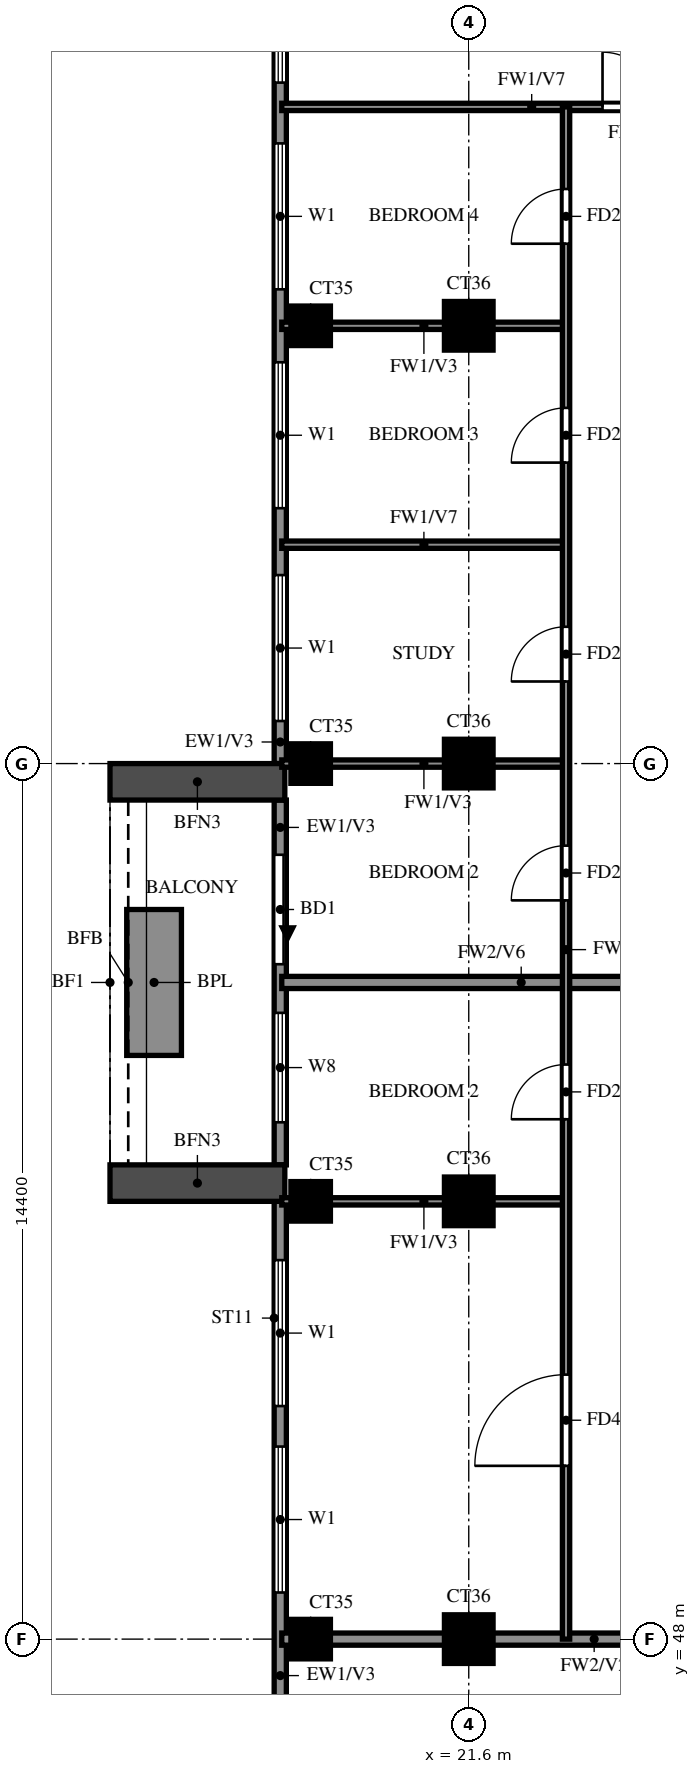
"""IFC4 building model, lengths in metres.
Left out: names, types, materials, properties, quantities, classifications, styles, units other than length and angle.
Written with IfcOpenShell. Run it as: python <this file> out.ifc"""

import sys

from ifc_helpers import new_model, si_unit, direction, frame, frame_2d, origin, origin_2d, place, context, subcontext, project, spatial, rectangle, extrude, source, transform, mapped, element, fill, save


model = new_model("IFC4")
c1 = context("Model", 3, precision=1e-05, world=origin(), true_north=direction((0.0, 1.0)))
c2 = subcontext(c1, "Body", "Model", "MODEL_VIEW")
j1 = project(units=[si_unit("LENGTHUNIT", "METRE"), si_unit("PLANEANGLEUNIT", "RADIAN")], contexts=[c1])
p1 = place(None, origin())
s1 = spatial("IfcSite", under=j1, at=p1, CompositionType="ELEMENT")
p2 = place(p1, origin())
s2 = spatial("IfcBuilding", under=s1, at=p2, CompositionType="ELEMENT")
p3 = place(p2, frame((0.0, 0.0, 236.0)))
s3 = spatial("IfcBuildingStorey", under=s2, at=p3, CompositionType="ELEMENT", Elevation=236.0)
m1 = source(origin(), c2, "Body", "SweptSolid", [
    extrude(rectangle(XDim=0.65, YDim=0.65, at=origin_2d()), origin(), (0.0, 0.0, 1.0), 3.22),
])
p4 = place(p3, frame((19.0, 48.0, 0.0), z_axis=(0.0, 0.0, 1.0), x_axis=(1.0, 0.0, 0.0)))
e1 = element("IfcColumn", 1, at=p4, inside=s3, PredefinedType="COLUMN", context=c2, shape_type="MappedRepresentation", body=[
    mapped(m1, transform((0.0, 0.0, 0.0))),
])
m2 = source(origin(), c2, "Body", "SweptSolid", [
    extrude(rectangle(XDim=0.8, YDim=0.8, at=origin_2d()), origin(), (0.0, 0.0, 1.0), 3.22),
])
p5 = place(p3, frame((21.6, 48.0, 0.0), z_axis=(0.0, 0.0, 1.0), x_axis=(1.0, 0.0, 0.0)))
e2 = element("IfcColumn", 2, at=p5, inside=s3, PredefinedType="COLUMN", context=c2, shape_type="MappedRepresentation", body=[
    mapped(m2, transform((0.0, 0.0, 0.0))),
])
p6 = place(p3, frame((19.0, 55.2, 0.0), z_axis=(0.0, 0.0, 1.0), x_axis=(1.0, 0.0, 0.0)))
e3 = element("IfcColumn", 3, at=p6, inside=s3, PredefinedType="COLUMN", context=c2, shape_type="MappedRepresentation", body=[
    mapped(m1, transform((0.0, 0.0, 0.0))),
])
p7 = place(p3, frame((21.6, 55.2, 0.0), z_axis=(0.0, 0.0, 1.0), x_axis=(1.0, 0.0, 0.0)))
e4 = element("IfcColumn", 4, at=p7, inside=s3, PredefinedType="COLUMN", context=c2, shape_type="MappedRepresentation", body=[
    mapped(m2, transform((0.0, 0.0, 0.0))),
])
p8 = place(p3, frame((19.0, 62.4, 0.0), z_axis=(0.0, 0.0, 1.0), x_axis=(1.0, 0.0, 0.0)))
e5 = element("IfcColumn", 5, at=p8, inside=s3, PredefinedType="COLUMN", context=c2, shape_type="MappedRepresentation", body=[
    mapped(m1, transform((0.0, 0.0, 0.0))),
])
p9 = place(p3, frame((21.6, 62.4, 0.0), z_axis=(0.0, 0.0, 1.0), x_axis=(1.0, 0.0, 0.0)))
e6 = element("IfcColumn", 6, at=p9, inside=s3, PredefinedType="COLUMN", context=c2, shape_type="MappedRepresentation", body=[
    mapped(m2, transform((0.0, 0.0, 0.0))),
])
p10 = place(p3, frame((19.0, 69.6, 0.0), z_axis=(0.0, 0.0, 1.0), x_axis=(1.0, 0.0, 0.0)))
e7 = element("IfcColumn", 7, at=p10, inside=s3, PredefinedType="COLUMN", context=c2, shape_type="MappedRepresentation", body=[
    mapped(m1, transform((0.0, 0.0, 0.0))),
])
p11 = place(p3, frame((21.6, 69.6, 0.0), z_axis=(0.0, 0.0, 1.0), x_axis=(1.0, 0.0, 0.0)))
e8 = element("IfcColumn", 8, at=p11, inside=s3, PredefinedType="COLUMN", context=c2, shape_type="MappedRepresentation", body=[
    mapped(m2, transform((0.0, 0.0, 0.0))),
])
p12 = place(p3, frame((18.5, 76.6, 0.0), z_axis=(0.0, 0.0, 1.0), x_axis=(0.0, -1.0, 0.0)))
e9 = element("IfcWall", 9, at=p12, inside=s3, PredefinedType="SOLIDWALL", context=c2, shape_type="SweptSolid", body=[
    extrude(rectangle(XDim=14.2, YDim=0.2, at=frame_2d((7.1, 0.0))), origin(), (0.0, 0.0, 1.0), 3.22),
])
p13 = place(p12, frame((11.1, 0.0, 0.6)))
e10 = element("IfcOpeningElement", 10, at=p13, cuts=e9, PredefinedType="OPENING", context=c2, shape_type="SweptSolid", body=[
    extrude(rectangle(XDim=2.4, YDim=2.4, at=frame_2d((1.2, 1.2))), frame((0.0, 0.11, 0.0), z_axis=(0.0, -1.0, 0.0), x_axis=(1.0, 0.0, 0.0)), (0.0, 0.0, 1.0), 0.22),
])
p14 = place(p12, frame((7.6, 0.0, 0.6)))
e11 = element("IfcOpeningElement", 11, at=p14, cuts=e9, PredefinedType="OPENING", context=c2, shape_type="SweptSolid", body=[
    extrude(rectangle(XDim=2.4, YDim=2.4, at=frame_2d((1.2, 1.2))), frame((0.0, 0.11, 0.0), z_axis=(0.0, -1.0, 0.0), x_axis=(1.0, 0.0, 0.0)), (0.0, 0.0, 1.0), 0.22),
])
p15 = place(p12, frame((4.0, 0.0, 0.6)))
e12 = element("IfcOpeningElement", 12, at=p15, cuts=e9, PredefinedType="OPENING", context=c2, shape_type="SweptSolid", body=[
    extrude(rectangle(XDim=2.4, YDim=2.4, at=frame_2d((1.2, 1.2))), frame((0.0, 0.11, 0.0), z_axis=(0.0, -1.0, 0.0), x_axis=(1.0, 0.0, 0.0)), (0.0, 0.0, 1.0), 0.22),
])
p16 = place(p12, frame((0.6, 0.0, 0.6)))
e13 = element("IfcOpeningElement", 13, at=p16, cuts=e9, PredefinedType="OPENING", context=c2, shape_type="SweptSolid", body=[
    extrude(rectangle(XDim=2.4, YDim=2.4, at=frame_2d((1.2, 1.2))), frame((0.0, 0.11, 0.0), z_axis=(0.0, -1.0, 0.0), x_axis=(1.0, 0.0, 0.0)), (0.0, 0.0, 1.0), 0.22),
])
p17 = place(p3, frame((18.5, 61.8, 0.0), z_axis=(0.0, 0.0, 1.0), x_axis=(0.0, -1.0, 0.0)))
e14 = element("IfcWall", 14, at=p17, inside=s3, PredefinedType="SOLIDWALL", context=c2, shape_type="SweptSolid", body=[
    extrude(rectangle(XDim=6.0, YDim=0.2, at=frame_2d((3.0, 0.0))), origin(), (0.0, 0.0, 1.0), 3.22),
])
p18 = place(p17, frame((0.9, 0.0, 0.0)))
e15 = element("IfcOpeningElement", 15, at=p18, cuts=e14, PredefinedType="OPENING", context=c2, shape_type="SweptSolid", body=[
    extrude(rectangle(XDim=1.8, YDim=2.4, at=frame_2d((0.9, 1.2))), frame((0.0, 0.11, 0.0), z_axis=(0.0, -1.0, 0.0), x_axis=(1.0, 0.0, 0.0)), (0.0, 0.0, 1.0), 0.22),
])
p19 = place(p17, frame((3.5, 0.0, 0.6)))
e16 = element("IfcOpeningElement", 16, at=p19, cuts=e14, PredefinedType="OPENING", context=c2, shape_type="SweptSolid", body=[
    extrude(rectangle(XDim=1.8, YDim=2.4, at=frame_2d((0.9, 1.2))), frame((0.0, 0.11, 0.0), z_axis=(0.0, -1.0, 0.0), x_axis=(1.0, 0.0, 0.0)), (0.0, 0.0, 1.0), 0.22),
])
p20 = place(p3, frame((18.5, 55.2, 0.0), z_axis=(0.0, 0.0, 1.0), x_axis=(0.0, -1.0, 0.0)))
e17 = element("IfcWall", 17, at=p20, inside=s3, PredefinedType="SOLIDWALL", context=c2, shape_type="SweptSolid", body=[
    extrude(rectangle(XDim=12.0, YDim=0.2, at=frame_2d((6.0, 0.0))), origin(), (0.0, 0.0, 1.0), 3.22),
])
p21 = place(p20, frame((8.3, 0.0, 0.6)))
e18 = element("IfcOpeningElement", 18, at=p21, cuts=e17, PredefinedType="OPENING", context=c2, shape_type="SweptSolid", body=[
    extrude(rectangle(XDim=2.4, YDim=2.4, at=frame_2d((1.2, 1.2))), frame((0.0, 0.11, 0.0), z_axis=(0.0, -1.0, 0.0), x_axis=(1.0, 0.0, 0.0)), (0.0, 0.0, 1.0), 0.22),
])
p22 = place(p20, frame((0.967, 0.0, 0.6)))
e19 = element("IfcOpeningElement", 19, at=p22, cuts=e17, PredefinedType="OPENING", context=c2, shape_type="SweptSolid", body=[
    extrude(rectangle(XDim=2.4, YDim=2.4, at=frame_2d((1.2, 1.2))), frame((0.0, 0.11, 0.0), z_axis=(0.0, -1.0, 0.0), x_axis=(1.0, 0.0, 0.0)), (0.0, 0.0, 1.0), 0.22),
])
p23 = place(p20, frame((4.033, 0.0, 0.6)))
e20 = element("IfcOpeningElement", 20, at=p23, cuts=e17, PredefinedType="OPENING", context=c2, shape_type="SweptSolid", body=[
    extrude(rectangle(XDim=2.4, YDim=2.4, at=frame_2d((1.2, 1.2))), frame((0.0, 0.11, 0.0), z_axis=(0.0, -1.0, 0.0), x_axis=(1.0, 0.0, 0.0)), (0.0, 0.0, 1.0), 0.22),
])
for number, where, z_axis, x_axis in (
    (21, (18.575, 62.1, 0.0), (0.0, 0.0, 1.0), (-1.0, 0.0, 0.0)),
    (22, (18.575, 55.5, 0.0), (0.0, 0.0, 1.0), (-1.0, 0.0, 0.0)),
):
    element("IfcWall", number, at=place(p3, frame(where, z_axis=z_axis, x_axis=x_axis)), inside=s3, PredefinedType="SOLIDWALL", context=c2, shape_type="SweptSolid", body=[
        extrude(rectangle(XDim=2.875, YDim=0.6, at=frame_2d((1.438, 0.0))), origin(), (0.0, 0.0, 1.0), 2.85),
    ])
p24 = place(p3, frame((16.425, 60.0, 0.0), z_axis=(0.0, 0.0, 1.0), x_axis=(0.0, -1.0, 0.0)))
e23 = element("IfcWall", 23, at=p24, inside=s3, PredefinedType="SOLIDWALL", context=c2, shape_type="SweptSolid", body=[
    extrude(rectangle(XDim=2.4, YDim=0.9, at=frame_2d((1.2, 0.0))), origin(), (0.0, 0.0, 1.0), 0.9),
])
p25 = place(p3, frame((18.525, 48.0, 0.0), z_axis=(0.0, 0.0, 1.0), x_axis=(1.0, 0.0, 0.0)))
e24 = element("IfcWall", 24, at=p25, inside=s3, PredefinedType="SOLIDWALL", context=c2, shape_type="SweptSolid", body=[
    extrude(rectangle(XDim=10.275, YDim=0.2, at=frame_2d((5.138, 0.0))), origin(), (0.0, 0.0, 1.0), 3.22),
])
p26 = place(p3, frame((18.525, 58.8, 0.0), z_axis=(0.0, 0.0, 1.0), x_axis=(1.0, 0.0, 0.0)))
e25 = element("IfcWall", 25, at=p26, inside=s3, PredefinedType="SOLIDWALL", context=c2, shape_type="SweptSolid", body=[
    extrude(rectangle(XDim=7.875, YDim=0.2, at=frame_2d((3.938, 0.0))), origin(), (0.0, 0.0, 1.0), 2.32),
])
for number, where, z_axis, x_axis in (
    (26, (18.525, 55.2, 0.0), (0.0, 0.0, 1.0), (1.0, 0.0, 0.0)),
    (27, (18.525, 62.4, 0.0), (0.0, 0.0, 1.0), (1.0, 0.0, 0.0)),
):
    element("IfcWall", number, at=place(p3, frame(where, z_axis=z_axis, x_axis=x_axis)), inside=s3, PredefinedType="PARTITIONING", context=c2, shape_type="SweptSolid", body=[
        extrude(rectangle(XDim=4.675, YDim=0.12, at=frame_2d((2.337, 0.0))), origin(), (0.0, 0.0, 1.0), 3.22),
    ])
p27 = place(p3, frame((18.525, 66.0, 0.0), z_axis=(0.0, 0.0, 1.0), x_axis=(1.0, 0.0, 0.0)))
e28 = element("IfcWall", 28, at=p27, inside=s3, PredefinedType="PARTITIONING", context=c2, shape_type="SweptSolid", body=[
    extrude(rectangle(XDim=4.675, YDim=0.12, at=frame_2d((2.337, 0.0))), origin(), (0.0, 0.0, 1.0), 2.32),
])
p28 = place(p3, frame((18.525, 69.6, 0.0), z_axis=(0.0, 0.0, 1.0), x_axis=(1.0, 0.0, 0.0)))
e29 = element("IfcWall", 29, at=p28, inside=s3, PredefinedType="PARTITIONING", context=c2, shape_type="SweptSolid", body=[
    extrude(rectangle(XDim=4.675, YDim=0.12, at=frame_2d((2.337, 0.0))), origin(), (0.0, 0.0, 1.0), 3.22),
])
p29 = place(p3, frame((18.525, 73.2, 0.0), z_axis=(0.0, 0.0, 1.0), x_axis=(1.0, 0.0, 0.0)))
e30 = element("IfcWall", 30, at=p29, inside=s3, PredefinedType="PARTITIONING", context=c2, shape_type="SweptSolid", body=[
    extrude(rectangle(XDim=10.275, YDim=0.12, at=frame_2d((5.138, 0.0))), origin(), (0.0, 0.0, 1.0), 2.32),
])
p30 = place(p29, frame((5.275, 0.0, 0.0)))
e31 = element("IfcOpeningElement", 31, at=p30, cuts=e30, PredefinedType="OPENING", context=c2, shape_type="SweptSolid", body=[
    extrude(rectangle(XDim=0.9, YDim=2.1, at=frame_2d((0.45, 1.05))), frame((0.0, 0.07, 0.0), z_axis=(0.0, -1.0, 0.0), x_axis=(1.0, 0.0, 0.0)), (0.0, 0.0, 1.0), 0.14),
])
p31 = place(p3, frame((23.2, 48.0, 0.0), z_axis=(0.0, 0.0, 1.0), x_axis=(0.0, 1.0, 0.0)))
e32 = element("IfcWall", 32, at=p31, inside=s3, PredefinedType="PARTITIONING", context=c2, shape_type="SweptSolid", body=[
    extrude(rectangle(XDim=25.2, YDim=0.12, at=frame_2d((12.6, 0.0))), origin(), (0.0, 0.0, 1.0), 3.22),
])
p32 = place(p31, frame((2.85, 0.0, 0.0)))
e33 = element("IfcOpeningElement", 33, at=p32, cuts=e32, PredefinedType="OPENING", context=c2, shape_type="SweptSolid", body=[
    extrude(rectangle(XDim=1.5, YDim=2.1, at=frame_2d((0.75, 1.05))), frame((0.0, 0.07, 0.0), z_axis=(0.0, -1.0, 0.0), x_axis=(1.0, 0.0, 0.0)), (0.0, 0.0, 1.0), 0.14),
])
p33 = place(p31, frame((8.55, 0.0, 0.0)))
e34 = element("IfcOpeningElement", 34, at=p33, cuts=e32, PredefinedType="OPENING", context=c2, shape_type="SweptSolid", body=[
    extrude(rectangle(XDim=0.9, YDim=2.1, at=frame_2d((0.45, 1.05))), frame((0.0, 0.07, 0.0), z_axis=(0.0, -1.0, 0.0), x_axis=(1.0, 0.0, 0.0)), (0.0, 0.0, 1.0), 0.14),
])
p34 = place(p31, frame((12.15, 0.0, 0.0)))
e35 = element("IfcOpeningElement", 35, at=p34, cuts=e32, PredefinedType="OPENING", context=c2, shape_type="SweptSolid", body=[
    extrude(rectangle(XDim=0.9, YDim=2.1, at=frame_2d((0.45, 1.05))), frame((0.0, 0.07, 0.0), z_axis=(0.0, -1.0, 0.0), x_axis=(1.0, 0.0, 0.0)), (0.0, 0.0, 1.0), 0.14),
])
p35 = place(p31, frame((15.75, 0.0, 0.0)))
e36 = element("IfcOpeningElement", 36, at=p35, cuts=e32, PredefinedType="OPENING", context=c2, shape_type="SweptSolid", body=[
    extrude(rectangle(XDim=0.9, YDim=2.1, at=frame_2d((0.45, 1.05))), frame((0.0, 0.07, 0.0), z_axis=(0.0, -1.0, 0.0), x_axis=(1.0, 0.0, 0.0)), (0.0, 0.0, 1.0), 0.14),
])
p36 = place(p31, frame((19.35, 0.0, 0.0)))
e37 = element("IfcOpeningElement", 37, at=p36, cuts=e32, PredefinedType="OPENING", context=c2, shape_type="SweptSolid", body=[
    extrude(rectangle(XDim=0.9, YDim=2.1, at=frame_2d((0.45, 1.05))), frame((0.0, 0.07, 0.0), z_axis=(0.0, -1.0, 0.0), x_axis=(1.0, 0.0, 0.0)), (0.0, 0.0, 1.0), 0.14),
])
p37 = place(p31, frame((22.95, 0.0, 0.0)))
e38 = element("IfcOpeningElement", 38, at=p37, cuts=e32, PredefinedType="OPENING", context=c2, shape_type="SweptSolid", body=[
    extrude(rectangle(XDim=0.9, YDim=2.1, at=frame_2d((0.45, 1.05))), frame((0.0, 0.07, 0.0), z_axis=(0.0, -1.0, 0.0), x_axis=(1.0, 0.0, 0.0)), (0.0, 0.0, 1.0), 0.14),
])
p38 = place(p13, origin())
e39 = element("IfcWindow", 39, at=p38, inside=s3, PartitioningType="DOUBLE_PANEL_VERTICAL", PredefinedType="WINDOW", context=c2, shape_type="SweptSolid", body=[
    extrude(rectangle(XDim=2.4, YDim=2.4, at=frame_2d((1.2, 1.2))), frame((0.0, 0.03, 0.0), z_axis=(0.0, -1.0, 0.0), x_axis=(1.0, 0.0, 0.0)), (0.0, 0.0, 1.0), 0.06),
])
fill(e10, e39)
p39 = place(p14, origin())
e40 = element("IfcWindow", 40, at=p39, inside=s3, PartitioningType="DOUBLE_PANEL_VERTICAL", PredefinedType="WINDOW", context=c2, shape_type="SweptSolid", body=[
    extrude(rectangle(XDim=2.4, YDim=2.4, at=frame_2d((1.2, 1.2))), frame((0.0, 0.03, 0.0), z_axis=(0.0, -1.0, 0.0), x_axis=(1.0, 0.0, 0.0)), (0.0, 0.0, 1.0), 0.06),
])
fill(e11, e40)
p40 = place(p15, origin())
e41 = element("IfcWindow", 41, at=p40, inside=s3, PartitioningType="DOUBLE_PANEL_VERTICAL", PredefinedType="WINDOW", context=c2, shape_type="SweptSolid", body=[
    extrude(rectangle(XDim=2.4, YDim=2.4, at=frame_2d((1.2, 1.2))), frame((0.0, 0.03, 0.0), z_axis=(0.0, -1.0, 0.0), x_axis=(1.0, 0.0, 0.0)), (0.0, 0.0, 1.0), 0.06),
])
fill(e12, e41)
p41 = place(p16, origin())
e42 = element("IfcWindow", 42, at=p41, inside=s3, PartitioningType="DOUBLE_PANEL_VERTICAL", PredefinedType="WINDOW", context=c2, shape_type="SweptSolid", body=[
    extrude(rectangle(XDim=2.4, YDim=2.4, at=frame_2d((1.2, 1.2))), frame((0.0, 0.03, 0.0), z_axis=(0.0, -1.0, 0.0), x_axis=(1.0, 0.0, 0.0)), (0.0, 0.0, 1.0), 0.06),
])
fill(e13, e42)
p42 = place(p18, origin())
e43 = element("IfcDoor", 43, at=p42, inside=s3, OperationType="DOUBLE_DOOR_SLIDING", PredefinedType="DOOR", context=c2, shape_type="SweptSolid", body=[
    extrude(rectangle(XDim=1.8, YDim=2.4, at=frame_2d((0.9, 1.2))), frame((0.0, 0.025, 0.0), z_axis=(0.0, -1.0, 0.0), x_axis=(1.0, 0.0, 0.0)), (0.0, 0.0, 1.0), 0.05),
])
fill(e15, e43)
p43 = place(p19, origin())
e44 = element("IfcWindow", 44, at=p43, inside=s3, PartitioningType="DOUBLE_PANEL_VERTICAL", PredefinedType="WINDOW", context=c2, shape_type="SweptSolid", body=[
    extrude(rectangle(XDim=1.8, YDim=2.4, at=frame_2d((0.9, 1.2))), frame((0.0, 0.03, 0.0), z_axis=(0.0, -1.0, 0.0), x_axis=(1.0, 0.0, 0.0)), (0.0, 0.0, 1.0), 0.06),
])
fill(e16, e44)
p44 = place(p22, origin())
e45 = element("IfcWindow", 45, at=p44, inside=s3, PartitioningType="DOUBLE_PANEL_VERTICAL", PredefinedType="WINDOW", context=c2, shape_type="SweptSolid", body=[
    extrude(rectangle(XDim=2.4, YDim=2.4, at=frame_2d((1.2, 1.2))), frame((0.0, 0.03, 0.0), z_axis=(0.0, -1.0, 0.0), x_axis=(1.0, 0.0, 0.0)), (0.0, 0.0, 1.0), 0.06),
])
fill(e19, e45)
p45 = place(p23, origin())
e46 = element("IfcWindow", 46, at=p45, inside=s3, PartitioningType="DOUBLE_PANEL_VERTICAL", PredefinedType="WINDOW", context=c2, shape_type="SweptSolid", body=[
    extrude(rectangle(XDim=2.4, YDim=2.4, at=frame_2d((1.2, 1.2))), frame((0.0, 0.03, 0.0), z_axis=(0.0, -1.0, 0.0), x_axis=(1.0, 0.0, 0.0)), (0.0, 0.0, 1.0), 0.06),
])
fill(e20, e46)
p46 = place(p32, origin())
e47 = element("IfcDoor", 47, at=p46, inside=s3, OperationType="SINGLE_SWING_LEFT", PredefinedType="DOOR", context=c2, shape_type="SweptSolid", body=[
    extrude(rectangle(XDim=1.5, YDim=2.1, at=frame_2d((0.75, 1.05))), frame((0.0, 0.025, 0.0), z_axis=(0.0, -1.0, 0.0), x_axis=(1.0, 0.0, 0.0)), (0.0, 0.0, 1.0), 0.05),
])
fill(e33, e47)
p47 = place(p33, origin())
e48 = element("IfcDoor", 48, at=p47, inside=s3, OperationType="SINGLE_SWING_RIGHT", PredefinedType="DOOR", context=c2, shape_type="SweptSolid", body=[
    extrude(rectangle(XDim=0.9, YDim=2.1, at=frame_2d((0.45, 1.05))), frame((0.0, 0.025, 0.0), z_axis=(0.0, -1.0, 0.0), x_axis=(1.0, 0.0, 0.0)), (0.0, 0.0, 1.0), 0.05),
])
fill(e34, e48)
p48 = place(p34, origin())
e49 = element("IfcDoor", 49, at=p48, inside=s3, OperationType="SINGLE_SWING_RIGHT", PredefinedType="DOOR", context=c2, shape_type="SweptSolid", body=[
    extrude(rectangle(XDim=0.9, YDim=2.1, at=frame_2d((0.45, 1.05))), frame((0.0, 0.025, 0.0), z_axis=(0.0, -1.0, 0.0), x_axis=(1.0, 0.0, 0.0)), (0.0, 0.0, 1.0), 0.05),
])
fill(e35, e49)
p49 = place(p35, origin())
e50 = element("IfcDoor", 50, at=p49, inside=s3, OperationType="SINGLE_SWING_LEFT", PredefinedType="DOOR", context=c2, shape_type="SweptSolid", body=[
    extrude(rectangle(XDim=0.9, YDim=2.1, at=frame_2d((0.45, 1.05))), frame((0.0, 0.025, 0.0), z_axis=(0.0, -1.0, 0.0), x_axis=(1.0, 0.0, 0.0)), (0.0, 0.0, 1.0), 0.05),
])
fill(e36, e50)
p50 = place(p36, origin())
e51 = element("IfcDoor", 51, at=p50, inside=s3, OperationType="SINGLE_SWING_LEFT", PredefinedType="DOOR", context=c2, shape_type="SweptSolid", body=[
    extrude(rectangle(XDim=0.9, YDim=2.1, at=frame_2d((0.45, 1.05))), frame((0.0, 0.025, 0.0), z_axis=(0.0, -1.0, 0.0), x_axis=(1.0, 0.0, 0.0)), (0.0, 0.0, 1.0), 0.05),
])
fill(e37, e51)
p51 = place(p37, origin())
e52 = element("IfcDoor", 52, at=p51, inside=s3, OperationType="SINGLE_SWING_RIGHT", PredefinedType="DOOR", context=c2, shape_type="SweptSolid", body=[
    extrude(rectangle(XDim=0.9, YDim=2.1, at=frame_2d((0.45, 1.05))), frame((0.0, 0.025, 0.0), z_axis=(0.0, -1.0, 0.0), x_axis=(1.0, 0.0, 0.0)), (0.0, 0.0, 1.0), 0.05),
])
fill(e38, e52)
p52 = place(p30, origin())
e53 = element("IfcDoor", 53, at=p52, inside=s3, OperationType="SINGLE_SWING_LEFT", PredefinedType="DOOR", context=c2, shape_type="SweptSolid", body=[
    extrude(rectangle(XDim=0.9, YDim=2.1, at=frame_2d((0.45, 1.05))), frame((0.0, 0.025, 0.0), z_axis=(0.0, -1.0, 0.0), x_axis=(1.0, 0.0, 0.0)), (0.0, 0.0, 1.0), 0.05),
])
fill(e31, e53)
save(model, sys.argv[1])
